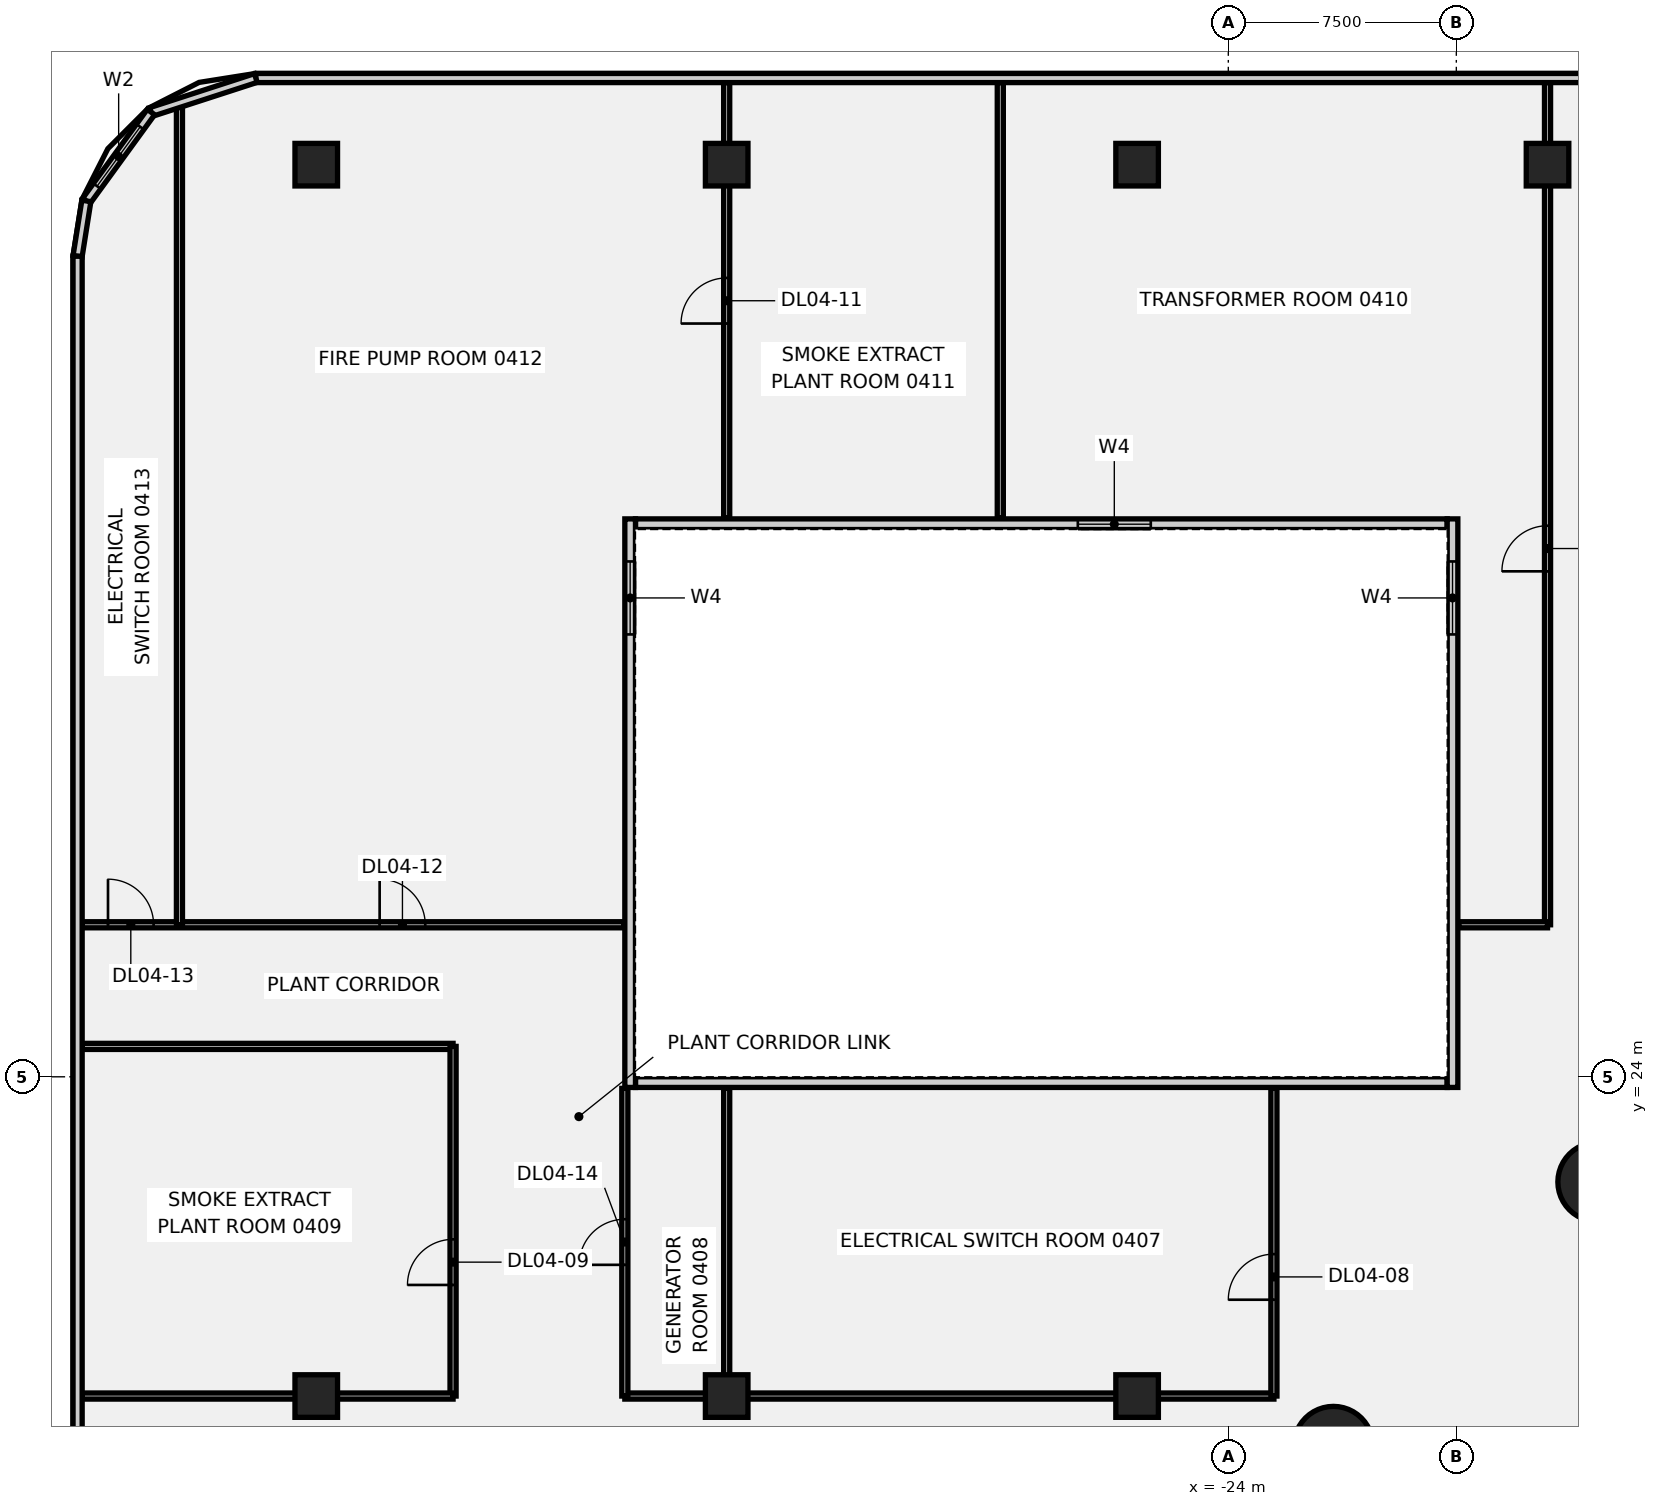
"""IFC4 building model, lengths in metres.
Left out: names, types, materials, properties, quantities, classifications, styles, units other than length and angle.
Written with IfcOpenShell. Run it as: python <this file> out.ifc"""

import sys

from ifc_helpers import new_model, si_unit, direction, frame, frame_2d, origin, origin_2d, place, context, subcontext, project, spatial, rectangle, circle, extrude, element, fill, save


model = new_model("IFC4")
c1 = context("Model", 3, precision=1e-05, world=origin(), true_north=direction((0.0, 1.0)))
c2 = subcontext(c1, "Body", "Model", "MODEL_VIEW")
j1 = project(units=[si_unit("LENGTHUNIT", "METRE"), si_unit("PLANEANGLEUNIT", "RADIAN")], contexts=[c1])
p1 = place(None, origin())
s1 = spatial("IfcSite", under=j1, at=p1, CompositionType="ELEMENT")
p2 = place(p1, origin())
s2 = spatial("IfcBuilding", under=s1, at=p2, CompositionType="ELEMENT")
p3 = place(p2, frame((0.0, 0.0, 25.0)))
s3 = spatial("IfcBuildingStorey", under=s2, at=p3, CompositionType="ELEMENT", Elevation=25.0)
for number, where, z_axis, x_axis in (
    (1, (-11.86, 20.543, -0.45), (0.0, 0.0, 1.0), (1.0, 0.0, 0.0)),
    (2, (-20.543, 11.86, -0.45), (0.0, 0.0, 1.0), (1.0, 0.0, 0.0)),
):
    element("IfcColumn", number, at=place(p3, frame(where, z_axis=z_axis, x_axis=x_axis)), inside=s3, PredefinedType="COLUMN", context=c2, shape_type="SweptSolid", body=[
        extrude(circle(Radius=1.3, at=origin_2d()), origin(), (0.0, 0.0, 1.0), 4.35),
    ])
for number, where, z_axis, x_axis in (
    (3, (-54.0, 13.5, -0.45), (0.0, 0.0, 1.0), (1.0, 0.0, 0.0)),
    (4, (-54.0, 54.0, -0.45), (0.0, 0.0, 1.0), (1.0, 0.0, 0.0)),
    (5, (-40.5, 13.5, -0.45), (0.0, 0.0, 1.0), (1.0, 0.0, 0.0)),
    (6, (-40.5, 54.0, -0.45), (0.0, 0.0, 1.0), (1.0, 0.0, 0.0)),
    (7, (-27.0, 13.5, -0.45), (0.0, 0.0, 1.0), (1.0, 0.0, 0.0)),
    (8, (-27.0, 54.0, -0.45), (0.0, 0.0, 1.0), (1.0, 0.0, 0.0)),
    (9, (-13.5, 54.0, -0.45), (0.0, 0.0, 1.0), (1.0, 0.0, 0.0)),
):
    element("IfcColumn", number, at=place(p3, frame(where, z_axis=z_axis, x_axis=x_axis)), inside=s3, PredefinedType="COLUMN", context=c2, shape_type="SweptSolid", body=[
        extrude(rectangle(XDim=1.4, YDim=1.4, at=origin_2d()), origin(), (0.0, 0.0, 1.0), 4.35),
    ])
p4 = place(p3, frame((-61.699, 25.0, 0.0), z_axis=(0.0, 0.0, 1.0), x_axis=(1.0, 0.0, 0.0)))
e10 = element("IfcWall", 10, at=p4, inside=s3, PredefinedType="PARTITIONING", context=c2, shape_type="SweptSolid", body=[
    extrude(rectangle(XDim=12.199, YDim=0.2, at=frame_2d((6.1, 0.0))), origin(), (0.0, 0.0, 1.0), 3.9),
])
p5 = place(p3, frame((-49.5, 13.5, 0.0), z_axis=(0.0, 0.0, 1.0), x_axis=(0.0, 1.0, 0.0)))
e11 = element("IfcWall", 11, at=p5, inside=s3, PredefinedType="PARTITIONING", context=c2, shape_type="SweptSolid", body=[
    extrude(rectangle(XDim=11.5, YDim=0.2, at=frame_2d((5.75, 0.0))), origin(), (0.0, 0.0, 1.0), 3.9),
])
p6 = place(p5, frame((3.654, 0.0, 0.0)))
e12 = element("IfcOpeningElement", 12, at=p6, cuts=e11, PredefinedType="OPENING", context=c2, shape_type="SweptSolid", body=[
    extrude(rectangle(XDim=1.5, YDim=2.1, at=frame_2d((0.75, 1.05))), frame((0.0, 0.11, 0.0), z_axis=(0.0, -1.0, 0.0), x_axis=(1.0, 0.0, 0.0)), (0.0, 0.0, 1.0), 0.22),
])
p7 = place(p3, frame((-61.699, 13.5, 0.0), z_axis=(0.0, 0.0, 1.0), x_axis=(1.0, 0.0, 0.0)))
e13 = element("IfcWall", 13, at=p7, inside=s3, PredefinedType="PARTITIONING", context=c2, shape_type="SweptSolid", body=[
    extrude(rectangle(XDim=12.199, YDim=0.2, at=frame_2d((6.1, 0.0))), origin(), (0.0, 0.0, 1.0), 3.9),
])
p8 = place(p3, frame((-61.699, 29.0, 0.0), z_axis=(0.0, 0.0, 1.0), x_axis=(1.0, 0.0, 0.0)))
e14 = element("IfcWall", 14, at=p8, inside=s3, PredefinedType="PARTITIONING", context=c2, shape_type="SweptSolid", body=[
    extrude(rectangle(XDim=17.819, YDim=0.2, at=frame_2d((8.91, 0.0))), origin(), (0.0, 0.0, 1.0), 3.9),
])
p9 = place(p8, frame((9.784, 0.0, 0.0)))
e15 = element("IfcOpeningElement", 15, at=p9, cuts=e14, PredefinedType="OPENING", context=c2, shape_type="SweptSolid", body=[
    extrude(rectangle(XDim=1.5, YDim=2.1, at=frame_2d((0.75, 1.05))), frame((0.0, 0.11, 0.0), z_axis=(0.0, -1.0, 0.0), x_axis=(1.0, 0.0, 0.0)), (0.0, 0.0, 1.0), 0.22),
])
p10 = place(p8, frame((0.849, 0.0, 0.0)))
e16 = element("IfcOpeningElement", 16, at=p10, cuts=e14, PredefinedType="OPENING", context=c2, shape_type="SweptSolid", body=[
    extrude(rectangle(XDim=1.5, YDim=2.1, at=frame_2d((0.75, 1.05))), frame((0.0, 0.11, 0.0), z_axis=(0.0, -1.0, 0.0), x_axis=(1.0, 0.0, 0.0)), (0.0, 0.0, 1.0), 0.22),
])
p11 = place(p3, frame((-58.5, 29.0, 0.0), z_axis=(0.0, 0.0, 1.0), x_axis=(0.0, 1.0, 0.0)))
e17 = element("IfcWall", 17, at=p11, inside=s3, PredefinedType="PARTITIONING", context=c2, shape_type="SweptSolid", body=[
    extrude(rectangle(XDim=27.04, YDim=0.2, at=frame_2d((13.52, 0.0))), origin(), (0.0, 0.0, 1.0), 3.9),
])
p12 = place(p3, frame((-43.85, 13.5, 0.0), z_axis=(0.0, 0.0, 1.0), x_axis=(1.0, 0.0, 0.0)))
e18 = element("IfcWall", 18, at=p12, inside=s3, PredefinedType="PARTITIONING", context=c2, shape_type="SweptSolid", body=[
    extrude(rectangle(XDim=21.35, YDim=0.2, at=frame_2d((10.675, 0.0))), origin(), (0.0, 0.0, 1.0), 3.9),
])
p13 = place(p3, frame((-43.85, 13.5, 0.0), z_axis=(0.0, 0.0, 1.0), x_axis=(0.0, 1.0, 0.0)))
e19 = element("IfcWall", 19, at=p13, inside=s3, PredefinedType="PARTITIONING", context=c2, shape_type="SweptSolid", body=[
    extrude(rectangle(XDim=10.12, YDim=0.2, at=frame_2d((5.06, 0.0))), origin(), (0.0, 0.0, 1.0), 3.9),
])
p14 = place(p13, frame((4.315, 0.0, 0.0)))
e20 = element("IfcOpeningElement", 20, at=p14, cuts=e19, PredefinedType="OPENING", context=c2, shape_type="SweptSolid", body=[
    extrude(rectangle(XDim=1.5, YDim=2.1, at=frame_2d((0.75, 1.05))), frame((0.0, 0.11, 0.0), z_axis=(0.0, -1.0, 0.0), x_axis=(1.0, 0.0, 0.0)), (0.0, 0.0, 1.0), 0.22),
])
p15 = place(p3, frame((-40.5, 13.5, 0.0), z_axis=(0.0, 0.0, 1.0), x_axis=(0.0, 1.0, 0.0)))
e21 = element("IfcWall", 21, at=p15, inside=s3, PredefinedType="PARTITIONING", context=c2, shape_type="SweptSolid", body=[
    extrude(rectangle(XDim=10.12, YDim=0.2, at=frame_2d((5.06, 0.0))), origin(), (0.0, 0.0, 1.0), 3.9),
])
p16 = place(p3, frame((-22.5, 13.5, 0.0), z_axis=(0.0, 0.0, 1.0), x_axis=(0.0, 1.0, 0.0)))
e22 = element("IfcWall", 22, at=p16, inside=s3, PredefinedType="PARTITIONING", context=c2, shape_type="SweptSolid", body=[
    extrude(rectangle(XDim=10.12, YDim=0.2, at=frame_2d((5.06, 0.0))), origin(), (0.0, 0.0, 1.0), 3.9),
])
p17 = place(p16, frame((3.168, 0.0, 0.0)))
e23 = element("IfcOpeningElement", 23, at=p17, cuts=e22, PredefinedType="OPENING", context=c2, shape_type="SweptSolid", body=[
    extrude(rectangle(XDim=1.5, YDim=2.1, at=frame_2d((0.75, 1.05))), frame((0.0, 0.11, 0.0), z_axis=(0.0, -1.0, 0.0), x_axis=(1.0, 0.0, 0.0)), (0.0, 0.0, 1.0), 0.22),
])
p18 = place(p3, frame((-40.5, 42.38, 0.0), z_axis=(0.0, 0.0, 1.0), x_axis=(0.0, 1.0, 0.0)))
e24 = element("IfcWall", 24, at=p18, inside=s3, PredefinedType="PARTITIONING", context=c2, shape_type="SweptSolid", body=[
    extrude(rectangle(XDim=14.319, YDim=0.2, at=frame_2d((7.16, 0.0))), origin(), (0.0, 0.0, 1.0), 3.9),
])
p19 = place(p18, frame((6.395, 0.0, 0.0)))
e25 = element("IfcOpeningElement", 25, at=p19, cuts=e24, PredefinedType="OPENING", context=c2, shape_type="SweptSolid", body=[
    extrude(rectangle(XDim=1.5, YDim=2.1, at=frame_2d((0.75, 1.05))), frame((0.0, 0.11, 0.0), z_axis=(0.0, -1.0, 0.0), x_axis=(1.0, 0.0, 0.0)), (0.0, 0.0, 1.0), 0.22),
])
p20 = place(p3, frame((-31.5, 42.38, 0.0), z_axis=(0.0, 0.0, 1.0), x_axis=(0.0, 1.0, 0.0)))
e26 = element("IfcWall", 26, at=p20, inside=s3, PredefinedType="PARTITIONING", context=c2, shape_type="SweptSolid", body=[
    extrude(rectangle(XDim=14.319, YDim=0.2, at=frame_2d((7.16, 0.0))), origin(), (0.0, 0.0, 1.0), 3.9),
])
p21 = place(p3, frame((-13.5, 29.0, 0.0), z_axis=(0.0, 0.0, 1.0), x_axis=(0.0, 1.0, 0.0)))
e27 = element("IfcWall", 27, at=p21, inside=s3, PredefinedType="PARTITIONING", context=c2, shape_type="SweptSolid", body=[
    extrude(rectangle(XDim=27.699, YDim=0.2, at=frame_2d((13.85, 0.0))), origin(), (0.0, 0.0, 1.0), 3.9),
])
p22 = place(p21, frame((11.625, 0.0, 0.0)))
e28 = element("IfcOpeningElement", 28, at=p22, cuts=e27, PredefinedType="OPENING", context=c2, shape_type="SweptSolid", body=[
    extrude(rectangle(XDim=1.5, YDim=2.1, at=frame_2d((0.75, 1.05))), frame((0.0, 0.11, 0.0), z_axis=(0.0, -1.0, 0.0), x_axis=(1.0, 0.0, 0.0)), (0.0, 0.0, 1.0), 0.22),
])
p23 = place(p3, frame((-16.42, 29.0, 0.0), z_axis=(0.0, 0.0, 1.0), x_axis=(1.0, 0.0, 0.0)))
e29 = element("IfcWall", 29, at=p23, inside=s3, PredefinedType="PARTITIONING", context=c2, shape_type="SweptSolid", body=[
    extrude(rectangle(XDim=2.92, YDim=0.2, at=frame_2d((1.46, 0.0))), origin(), (0.0, 0.0, 1.0), 3.9),
])
p24 = place(p3, frame((55.988, 56.85, 0.0), z_axis=(0.0, 0.0, 1.0), x_axis=(-1.0, 0.0, 0.0)))
e30 = element("IfcWall", 30, at=p24, inside=s3, PredefinedType="SOLIDWALL", context=c2, shape_type="SweptSolid", body=[
    extrude(rectangle(XDim=111.977, YDim=0.3, at=frame_2d((55.988, 0.0))), origin(), (0.0, 0.0, 1.0), 3.9),
])
p25 = place(p24, frame((12.488, 0.0, 1.4)))
e31 = element("IfcOpeningElement", 31, at=p25, cuts=e30, PredefinedType="OPENING", context=c2, shape_type="SweptSolid", body=[
    extrude(rectangle(XDim=6.0, YDim=2.2, at=frame_2d((3.0, 1.1))), frame((0.0, 0.16, 0.0), z_axis=(0.0, -1.0, 0.0), x_axis=(1.0, 0.0, 0.0)), (0.0, 0.0, 1.0), 0.32),
])
p26 = place(p3, frame((-55.988, 56.85, 0.0), z_axis=(0.0, 0.0, 1.0), x_axis=(-0.951204127457, -0.308562324189, 0.0)))
e32 = element("IfcWall", 32, at=p26, inside=s3, PredefinedType="SOLIDWALL", context=c2, shape_type="SweptSolid", body=[
    extrude(rectangle(XDim=3.626, YDim=0.3, at=frame_2d((1.813, 0.0))), origin(), (0.0, 0.0, 1.0), 3.9),
])
p27 = place(p3, frame((-59.438, 55.731, 0.0), z_axis=(0.0, 0.0, 1.0), x_axis=(-0.587794100557, -0.80901056566, 0.0)))
e33 = element("IfcWall", 33, at=p27, inside=s3, PredefinedType="SOLIDWALL", context=c2, shape_type="SweptSolid", body=[
    extrude(rectangle(XDim=3.615, YDim=0.3, at=frame_2d((1.807, 0.0))), origin(), (0.0, 0.0, 1.0), 3.9),
])
p28 = place(p27, frame((0.6, 0.0, 1.4)))
e34 = element("IfcOpeningElement", 34, at=p28, cuts=e33, PredefinedType="OPENING", context=c2, shape_type="SweptSolid", body=[
    extrude(rectangle(XDim=2.414, YDim=2.2, at=frame_2d((1.207, 1.1))), frame((0.0, 0.16, 0.0), z_axis=(0.0, -1.0, 0.0), x_axis=(1.0, 0.0, 0.0)), (0.0, 0.0, 1.0), 0.32),
])
p29 = place(p3, frame((-61.562, 52.807, 0.0), z_axis=(0.0, 0.0, 1.0), x_axis=(-0.15643911056, -0.987687604806, 0.0)))
e35 = element("IfcWall", 35, at=p29, inside=s3, PredefinedType="SOLIDWALL", context=c2, shape_type="SweptSolid", body=[
    extrude(rectangle(XDim=1.842, YDim=0.3, at=frame_2d((0.921, 0.0))), origin(), (0.0, 0.0, 1.0), 3.9),
])
p30 = place(p3, frame((-61.85, 50.988, 0.0), z_axis=(0.0, 0.0, 1.0), x_axis=(0.0, -1.0, 0.0)))
e36 = element("IfcWall", 36, at=p30, inside=s3, PredefinedType="SOLIDWALL", context=c2, shape_type="SweptSolid", body=[
    extrude(rectangle(XDim=101.977, YDim=0.3, at=frame_2d((50.988, 0.0))), origin(), (0.0, 0.0, 1.0), 3.9),
])
p31 = place(p30, frame((47.988, 0.0, 1.4)))
e37 = element("IfcOpeningElement", 37, at=p31, cuts=e36, PredefinedType="OPENING", context=c2, shape_type="SweptSolid", body=[
    extrude(rectangle(XDim=6.0, YDim=2.2, at=frame_2d((3.0, 1.1))), frame((0.0, 0.16, 0.0), z_axis=(0.0, -1.0, 0.0), x_axis=(1.0, 0.0, 0.0)), (0.0, 0.0, 1.0), 0.32),
])
p32 = place(p3, frame((-43.5, 23.825, 0.0), z_axis=(0.0, 0.0, 1.0), x_axis=(1.0, 0.0, 0.0)))
e38 = element("IfcWall", 38, at=p32, inside=s3, PredefinedType="SOLIDWALL", context=c2, shape_type="SweptSolid", body=[
    extrude(rectangle(XDim=26.7, YDim=0.35, at=frame_2d((13.35, 0.0))), origin(), (0.0, 0.0, 1.0), 3.9),
])
p33 = place(p3, frame((-43.5, 42.175, 0.0), z_axis=(0.0, 0.0, 1.0), x_axis=(1.0, 0.0, 0.0)))
e39 = element("IfcWall", 39, at=p33, inside=s3, PredefinedType="SOLIDWALL", context=c2, shape_type="SweptSolid", body=[
    extrude(rectangle(XDim=26.7, YDim=0.35, at=frame_2d((13.35, 0.0))), origin(), (0.0, 0.0, 1.0), 3.9),
])
p34 = place(p33, frame((14.55, 0.0, 1.0)))
e40 = element("IfcOpeningElement", 40, at=p34, cuts=e39, PredefinedType="OPENING", context=c2, shape_type="SweptSolid", body=[
    extrude(rectangle(XDim=2.4, YDim=1.8, at=frame_2d((1.2, 0.9))), frame((0.0, 0.185, 0.0), z_axis=(0.0, -1.0, 0.0), x_axis=(1.0, 0.0, 0.0)), (0.0, 0.0, 1.0), 0.37),
])
p35 = place(p3, frame((-43.675, 23.65, 0.0), z_axis=(0.0, 0.0, 1.0), x_axis=(0.0, 1.0, 0.0)))
e41 = element("IfcWall", 41, at=p35, inside=s3, PredefinedType="SOLIDWALL", context=c2, shape_type="SweptSolid", body=[
    extrude(rectangle(XDim=18.7, YDim=0.35, at=frame_2d((9.35, 0.0))), origin(), (0.0, 0.0, 1.0), 3.9),
])
p36 = place(p35, frame((14.9, 0.0, 1.0)))
e42 = element("IfcOpeningElement", 42, at=p36, cuts=e41, PredefinedType="OPENING", context=c2, shape_type="SweptSolid", body=[
    extrude(rectangle(XDim=2.4, YDim=1.8, at=frame_2d((1.2, 0.9))), frame((0.0, 0.185, 0.0), z_axis=(0.0, -1.0, 0.0), x_axis=(1.0, 0.0, 0.0)), (0.0, 0.0, 1.0), 0.37),
])
p37 = place(p3, frame((-16.625, 23.65, 0.0), z_axis=(0.0, 0.0, 1.0), x_axis=(0.0, 1.0, 0.0)))
e43 = element("IfcWall", 43, at=p37, inside=s3, PredefinedType="SOLIDWALL", context=c2, shape_type="SweptSolid", body=[
    extrude(rectangle(XDim=18.7, YDim=0.35, at=frame_2d((9.35, 0.0))), origin(), (0.0, 0.0, 1.0), 3.9),
])
p38 = place(p37, frame((14.9, 0.0, 1.0)))
e44 = element("IfcOpeningElement", 44, at=p38, cuts=e43, PredefinedType="OPENING", context=c2, shape_type="SweptSolid", body=[
    extrude(rectangle(XDim=2.4, YDim=1.8, at=frame_2d((1.2, 0.9))), frame((0.0, 0.185, 0.0), z_axis=(0.0, -1.0, 0.0), x_axis=(1.0, 0.0, 0.0)), (0.0, 0.0, 1.0), 0.37),
])
p39 = place(p17, origin())
e45 = element("IfcDoor", 45, at=p39, inside=s3, OperationType="SINGLE_SWING_RIGHT", PredefinedType="DOOR", context=c2, shape_type="SweptSolid", body=[
    extrude(rectangle(XDim=1.5, YDim=2.1, at=frame_2d((0.75, 1.05))), frame((0.0, 0.025, 0.0), z_axis=(0.0, -1.0, 0.0), x_axis=(1.0, 0.0, 0.0)), (0.0, 0.0, 1.0), 0.05),
])
fill(e23, e45)
p40 = place(p6, origin())
e46 = element("IfcDoor", 46, at=p40, inside=s3, OperationType="SINGLE_SWING_LEFT", PredefinedType="DOOR", context=c2, shape_type="SweptSolid", body=[
    extrude(rectangle(XDim=1.5, YDim=2.1, at=frame_2d((0.75, 1.05))), frame((0.0, 0.025, 0.0), z_axis=(0.0, -1.0, 0.0), x_axis=(1.0, 0.0, 0.0)), (0.0, 0.0, 1.0), 0.05),
])
fill(e12, e46)
p41 = place(p22, origin())
e47 = element("IfcDoor", 47, at=p41, inside=s3, OperationType="SINGLE_SWING_RIGHT", PredefinedType="DOOR", context=c2, shape_type="SweptSolid", body=[
    extrude(rectangle(XDim=1.5, YDim=2.1, at=frame_2d((0.75, 1.05))), frame((0.0, 0.025, 0.0), z_axis=(0.0, -1.0, 0.0), x_axis=(1.0, 0.0, 0.0)), (0.0, 0.0, 1.0), 0.05),
])
fill(e28, e47)
p42 = place(p19, origin())
e48 = element("IfcDoor", 48, at=p42, inside=s3, OperationType="SINGLE_SWING_LEFT", PredefinedType="DOOR", context=c2, shape_type="SweptSolid", body=[
    extrude(rectangle(XDim=1.5, YDim=2.1, at=frame_2d((0.75, 1.05))), frame((0.0, 0.025, 0.0), z_axis=(0.0, -1.0, 0.0), x_axis=(1.0, 0.0, 0.0)), (0.0, 0.0, 1.0), 0.05),
])
fill(e25, e48)
p43 = place(p9, origin())
e49 = element("IfcDoor", 49, at=p43, inside=s3, OperationType="SINGLE_SWING_RIGHT", PredefinedType="DOOR", context=c2, shape_type="SweptSolid", body=[
    extrude(rectangle(XDim=1.5, YDim=2.1, at=frame_2d((0.75, 1.05))), frame((0.0, 0.025, 0.0), z_axis=(0.0, -1.0, 0.0), x_axis=(1.0, 0.0, 0.0)), (0.0, 0.0, 1.0), 0.05),
])
fill(e15, e49)
p44 = place(p10, origin())
e50 = element("IfcDoor", 50, at=p44, inside=s3, OperationType="SINGLE_SWING_LEFT", PredefinedType="DOOR", context=c2, shape_type="SweptSolid", body=[
    extrude(rectangle(XDim=1.5, YDim=2.1, at=frame_2d((0.75, 1.05))), frame((0.0, 0.025, 0.0), z_axis=(0.0, -1.0, 0.0), x_axis=(1.0, 0.0, 0.0)), (0.0, 0.0, 1.0), 0.05),
])
fill(e16, e50)
p45 = place(p14, origin())
e51 = element("IfcDoor", 51, at=p45, inside=s3, OperationType="SINGLE_SWING_RIGHT", PredefinedType="DOOR", context=c2, shape_type="SweptSolid", body=[
    extrude(rectangle(XDim=1.5, YDim=2.1, at=frame_2d((0.75, 1.05))), frame((0.0, 0.025, 0.0), z_axis=(0.0, -1.0, 0.0), x_axis=(1.0, 0.0, 0.0)), (0.0, 0.0, 1.0), 0.05),
])
fill(e20, e51)
p46 = place(p28, origin())
e52 = element("IfcWindow", 52, at=p46, inside=s3, PartitioningType="SINGLE_PANEL", PredefinedType="WINDOW", context=c2, shape_type="SweptSolid", body=[
    extrude(rectangle(XDim=2.414, YDim=2.2, at=frame_2d((1.207, 1.1))), frame((0.0, 0.03, 0.0), z_axis=(0.0, -1.0, 0.0), x_axis=(1.0, 0.0, 0.0)), (0.0, 0.0, 1.0), 0.06),
])
fill(e34, e52)
p47 = place(p34, origin())
e53 = element("IfcWindow", 53, at=p47, inside=s3, PartitioningType="SINGLE_PANEL", PredefinedType="WINDOW", context=c2, shape_type="SweptSolid", body=[
    extrude(rectangle(XDim=2.4, YDim=1.8, at=frame_2d((1.2, 0.9))), frame((0.0, 0.03, 0.0), z_axis=(0.0, -1.0, 0.0), x_axis=(1.0, 0.0, 0.0)), (0.0, 0.0, 1.0), 0.06),
])
fill(e40, e53)
p48 = place(p36, origin())
e54 = element("IfcWindow", 54, at=p48, inside=s3, PartitioningType="SINGLE_PANEL", PredefinedType="WINDOW", context=c2, shape_type="SweptSolid", body=[
    extrude(rectangle(XDim=2.4, YDim=1.8, at=frame_2d((1.2, 0.9))), frame((0.0, 0.03, 0.0), z_axis=(0.0, -1.0, 0.0), x_axis=(1.0, 0.0, 0.0)), (0.0, 0.0, 1.0), 0.06),
])
fill(e42, e54)
p49 = place(p38, origin())
e55 = element("IfcWindow", 55, at=p49, inside=s3, PartitioningType="SINGLE_PANEL", PredefinedType="WINDOW", context=c2, shape_type="SweptSolid", body=[
    extrude(rectangle(XDim=2.4, YDim=1.8, at=frame_2d((1.2, 0.9))), frame((0.0, 0.03, 0.0), z_axis=(0.0, -1.0, 0.0), x_axis=(1.0, 0.0, 0.0)), (0.0, 0.0, 1.0), 0.06),
])
fill(e44, e55)
save(model, sys.argv[1])
